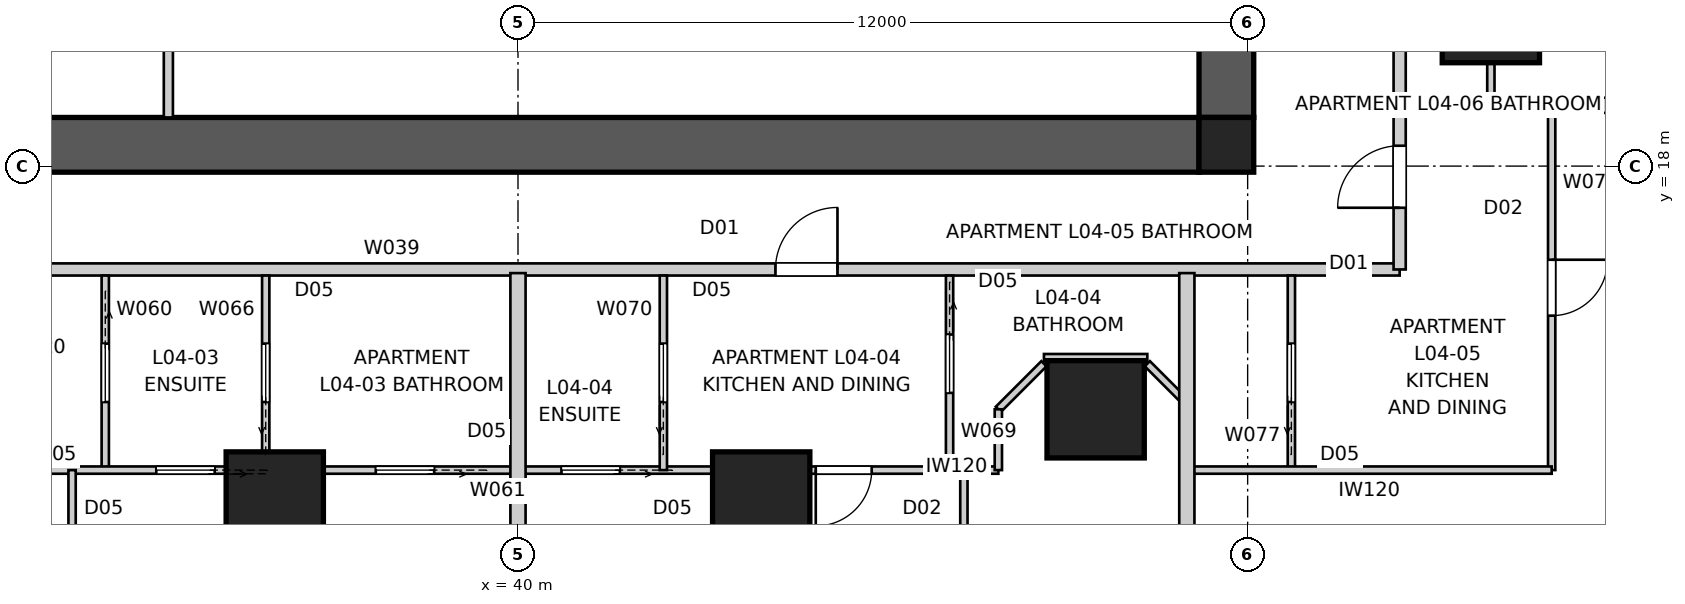
"""IFC4 building model, lengths in metres.
Left out: names, types, materials, properties, quantities, classifications, styles, units other than length and angle.
Written with IfcOpenShell. Run it as: python <this file> out.ifc"""

import sys

from ifc_helpers import new_model, si_unit, direction, frame, frame_2d, origin, origin_2d, place, context, subcontext, project, spatial, polyline, rectangle, outline, extrude, element, fill, save


model = new_model("IFC4")
c1 = context("Model", 3, precision=1e-05, world=origin(), true_north=direction((0.0, 1.0)))
c2 = subcontext(c1, "Body", "Model", "MODEL_VIEW")
j1 = project(units=[si_unit("LENGTHUNIT", "METRE"), si_unit("PLANEANGLEUNIT", "RADIAN")], contexts=[c1])
p1 = place(None, origin())
s1 = spatial("IfcSite", under=j1, at=p1, CompositionType="ELEMENT")
p2 = place(p1, origin())
s2 = spatial("IfcBuilding", under=s1, at=p2, CompositionType="ELEMENT")
p3 = place(p2, frame((0.0, 0.0, 18.4)))
s3 = spatial("IfcBuildingStorey", under=s2, at=p3, CompositionType="ELEMENT", Elevation=18.4)
p4 = place(p3, frame((51.2, 18.35, 0.0), z_axis=(0.0, 0.0, 1.0), x_axis=(-1.0, 0.0, 0.0)))
e1 = element("IfcWall", 1, at=p4, inside=s3, PredefinedType="SHEAR", context=c2, shape_type="SweptSolid", body=[
    extrude(outline(polyline([(0.0, -0.45), (22.4, -0.45), (22.4, -0.025), (22.85, -0.025), (22.85, 0.025), (22.4, 0.025), (22.4, 0.45), (0.0, 0.45), (0.0, 0.025), (-0.45, 0.025), (-0.45, -0.025), (0.0, -0.025), (0.0, -0.45)])), origin(), (0.0, 0.0, 1.0), 3.4),
])
p5 = place(p3, frame((51.65, 18.8, 0.0), z_axis=(0.0, 0.0, 1.0), x_axis=(0.0, 1.0, 0.0)))
e2 = element("IfcWall", 2, at=p5, inside=s3, PredefinedType="SHEAR", context=c2, shape_type="SweptSolid", body=[
    extrude(outline(polyline([(0.0, -0.45), (22.4, -0.45), (22.4, -0.025), (22.85, -0.025), (22.85, 0.025), (22.4, 0.025), (22.4, 0.45), (0.0, 0.45), (0.0, 0.025), (-0.45, 0.025), (-0.45, -0.025), (0.0, -0.025), (0.0, -0.45)])), origin(), (0.0, 0.0, 1.0), 3.4),
])
p6 = place(p5, frame((11.14, 0.0, 0.0)))
e3 = element("IfcOpeningElement", 3, at=p6, cuts=e2, PredefinedType="OPENING", context=c2, shape_type="SweptSolid", body=[
    extrude(rectangle(XDim=1.02, YDim=2.4, at=frame_2d((0.51, 1.2))), frame((0.0, 0.46, 0.0), z_axis=(0.0, -1.0, 0.0), x_axis=(1.0, 0.0, 0.0)), (0.0, 0.0, 1.0), 0.92),
])
p7 = place(p3, frame((51.65, 18.35, 0.0), z_axis=(0.0, 0.0, 1.0), x_axis=(1.0, 0.0, 0.0)))
e4 = element("IfcColumn", 4, at=p7, inside=s3, PredefinedType="COLUMN", context=c2, shape_type="SweptSolid", body=[
    extrude(rectangle(XDim=0.9, YDim=0.9, at=origin_2d()), origin(), (0.0, 0.0, 1.0), 3.4),
])
for number, where, z_axis, x_axis in (
    (5, (36.0, 12.5, 0.0), (0.0, 0.0, 1.0), (1.0, 0.0, 0.0)),
    (6, (44.0, 12.5, 0.0), (0.0, 0.0, 1.0), (1.0, 0.0, 0.0)),
    (7, (49.5, 14.0, 0.0), (0.0, 0.0, 1.0), (1.0, 0.0, 0.0)),
    (8, (56.0, 20.5, 0.0), (0.0, 0.0, 1.0), (1.0, 0.0, 0.0)),
):
    element("IfcColumn", number, at=place(p3, frame(where, z_axis=z_axis, x_axis=x_axis)), inside=s3, PredefinedType="COLUMN", context=c2, shape_type="SweptSolid", body=[
        extrude(rectangle(XDim=1.6, YDim=1.6, at=origin_2d()), origin(), (0.0, 0.0, 1.0), 3.4),
    ])
p8 = place(p3, frame((25.5, 16.3, 0.0), z_axis=(0.0, 0.0, 1.0), x_axis=(1.0, 0.0, 0.0)))
e9 = element("IfcWall", 9, at=p8, inside=s3, PredefinedType="PARTITIONING", context=c2, shape_type="SweptSolid", body=[
    extrude(rectangle(XDim=29.0, YDim=0.2, at=frame_2d((14.5, 0.0))), origin(), (0.0, 0.0, 1.0), 3.25),
])
p9 = place(p8, frame((18.734, 0.0, 0.0)))
e10 = element("IfcOpeningElement", 10, at=p9, cuts=e9, PredefinedType="OPENING", context=c2, shape_type="SweptSolid", body=[
    extrude(rectangle(XDim=1.02, YDim=2.34, at=frame_2d((0.51, 1.17))), frame((0.0, 0.11, 0.0), z_axis=(0.0, -1.0, 0.0), x_axis=(1.0, 0.0, 0.0)), (0.0, 0.0, 1.0), 0.22),
])
p10 = place(p8, frame((5.096, 0.0, 0.0)))
e11 = element("IfcOpeningElement", 11, at=p10, cuts=e9, PredefinedType="OPENING", context=c2, shape_type="SweptSolid", body=[
    extrude(rectangle(XDim=1.02, YDim=2.34, at=frame_2d((0.51, 1.17))), frame((0.0, 0.11, 0.0), z_axis=(0.0, -1.0, 0.0), x_axis=(1.0, 0.0, 0.0)), (0.0, 0.0, 1.0), 0.22),
])
p11 = place(p3, frame((54.5, 16.3, 0.0), z_axis=(0.0, 0.0, 1.0), x_axis=(0.0, 1.0, 0.0)))
e12 = element("IfcWall", 12, at=p11, inside=s3, PredefinedType="PARTITIONING", context=c2, shape_type="SweptSolid", body=[
    extrude(rectangle(XDim=27.4, YDim=0.2, at=frame_2d((13.7, 0.0))), origin(), (0.0, 0.0, 1.0), 3.25),
])
p12 = place(p11, frame((20.998, 0.0, 0.0)))
e13 = element("IfcOpeningElement", 13, at=p12, cuts=e12, PredefinedType="OPENING", context=c2, shape_type="SweptSolid", body=[
    extrude(rectangle(XDim=1.02, YDim=2.34, at=frame_2d((0.51, 1.17))), frame((0.0, 0.11, 0.0), z_axis=(0.0, -1.0, 0.0), x_axis=(1.0, 0.0, 0.0)), (0.0, 0.0, 1.0), 0.22),
])
p13 = place(p11, frame((11.119, 0.0, 0.0)))
e14 = element("IfcOpeningElement", 14, at=p13, cuts=e12, PredefinedType="OPENING", context=c2, shape_type="SweptSolid", body=[
    extrude(rectangle(XDim=1.02, YDim=2.34, at=frame_2d((0.51, 1.17))), frame((0.0, 0.11, 0.0), z_axis=(0.0, -1.0, 0.0), x_axis=(1.0, 0.0, 0.0)), (0.0, 0.0, 1.0), 0.22),
])
p14 = place(p11, frame((1.015, 0.0, 0.0)))
e15 = element("IfcOpeningElement", 15, at=p14, cuts=e12, PredefinedType="OPENING", context=c2, shape_type="SweptSolid", body=[
    extrude(rectangle(XDim=1.02, YDim=2.34, at=frame_2d((0.51, 1.17))), frame((0.0, 0.11, 0.0), z_axis=(0.0, -1.0, 0.0), x_axis=(1.0, 0.0, 0.0)), (0.0, 0.0, 1.0), 0.22),
])
p15 = place(p3, frame((40.0, 4.0, 0.0), z_axis=(0.0, 0.0, 1.0), x_axis=(0.0, 1.0, 0.0)))
e16 = element("IfcWall", 16, at=p15, inside=s3, PredefinedType="PARTITIONING", context=c2, shape_type="SweptSolid", body=[
    extrude(rectangle(XDim=8.5, YDim=0.25, at=frame_2d((4.25, 0.0))), origin(), (0.0, 0.0, 1.0), 3.25),
])
p16 = place(p3, frame((40.0, 12.5, 0.0), z_axis=(0.0, 0.0, 1.0), x_axis=(0.0, 1.0, 0.0)))
e17 = element("IfcWall", 17, at=p16, inside=s3, PredefinedType="PARTITIONING", context=c2, shape_type="SweptSolid", body=[
    extrude(rectangle(XDim=3.74, YDim=0.25, at=frame_2d((1.87, 0.0))), origin(), (0.0, 0.0, 1.0), 2.795),
])
p17 = place(p3, frame((51.0, 4.0, 0.0), z_axis=(0.0, 0.0, 1.0), x_axis=(0.0, 1.0, 0.0)))
e18 = element("IfcWall", 18, at=p17, inside=s3, PredefinedType="PARTITIONING", context=c2, shape_type="SweptSolid", body=[
    extrude(rectangle(XDim=12.24, YDim=0.25, at=frame_2d((6.12, 0.0))), origin(), (0.0, 0.0, 1.0), 3.25),
])
p18 = place(p3, frame((66.0, 19.0, 0.0), z_axis=(0.0, 0.0, 1.0), x_axis=(-1.0, 0.0, 0.0)))
e19 = element("IfcWall", 19, at=p18, inside=s3, PredefinedType="PARTITIONING", context=c2, shape_type="SweptSolid", body=[
    extrude(rectangle(XDim=11.44, YDim=0.25, at=frame_2d((5.72, 0.0))), origin(), (0.0, 0.0, 1.0), 3.25),
])
p19 = place(p3, frame((34.25, 18.8, 0.0), z_axis=(0.0, 0.0, 1.0), x_axis=(0.0, 1.0, 0.0)))
e20 = element("IfcWall", 20, at=p19, inside=s3, PredefinedType="SOLIDWALL", context=c2, shape_type="SweptSolid", body=[
    extrude(rectangle(XDim=5.9, YDim=0.15, at=frame_2d((2.95, 0.0))), origin(), (0.0, 0.0, 1.0), 3.25),
])
p20 = place(p3, frame((33.212, 16.2, 0.0), z_axis=(0.0, 0.0, 1.0), x_axis=(0.0, -1.0, 0.0)))
e21 = element("IfcWall", 21, at=p20, inside=s3, PredefinedType="PARTITIONING", context=c2, shape_type="SweptSolid", body=[
    extrude(rectangle(XDim=3.2, YDim=0.12, at=frame_2d((1.6, 0.0))), origin(), (0.0, 0.0, 1.0), 3.25),
])
p21 = place(p20, frame((1.12, 0.0, 0.0)))
e22 = element("IfcOpeningElement", 22, at=p21, cuts=e21, PredefinedType="OPENING", context=c2, shape_type="SweptSolid", body=[
    extrude(rectangle(XDim=0.96, YDim=2.1, at=frame_2d((0.48, 1.05))), frame((0.0, 0.07, 0.0), z_axis=(0.0, -1.0, 0.0), x_axis=(1.0, 0.0, 0.0)), (0.0, 0.0, 1.0), 0.14),
])
p22 = place(p3, frame((47.9, 13.0, 0.0), z_axis=(0.0, 0.0, 1.0), x_axis=(-1.0, 0.0, 0.0)))
e23 = element("IfcWall", 23, at=p22, inside=s3, PredefinedType="PARTITIONING", context=c2, shape_type="SweptSolid", body=[
    extrude(rectangle(XDim=15.8, YDim=0.12, at=frame_2d((7.9, 0.0))), origin(), (0.0, 0.0, 1.0), 2.55),
])
p23 = place(p22, frame((2.083, 0.0, 0.0)))
e24 = element("IfcOpeningElement", 24, at=p23, cuts=e23, PredefinedType="OPENING", context=c2, shape_type="SweptSolid", body=[
    extrude(rectangle(XDim=0.92, YDim=2.34, at=frame_2d((0.46, 1.17))), frame((0.0, 0.07, 0.0), z_axis=(0.0, -1.0, 0.0), x_axis=(1.0, 0.0, 0.0)), (0.0, 0.0, 1.0), 0.14),
])
p24 = place(p22, frame((6.225, 0.0, 0.0)))
e25 = element("IfcOpeningElement", 25, at=p24, cuts=e23, PredefinedType="OPENING", context=c2, shape_type="SweptSolid", body=[
    extrude(rectangle(XDim=0.96, YDim=2.1, at=frame_2d((0.48, 1.05))), frame((0.0, 0.07, 0.0), z_axis=(0.0, -1.0, 0.0), x_axis=(1.0, 0.0, 0.0)), (0.0, 0.0, 1.0), 0.14),
])
p25 = place(p22, frame((12.888, 0.0, 0.0)))
e26 = element("IfcOpeningElement", 26, at=p25, cuts=e23, PredefinedType="OPENING", context=c2, shape_type="SweptSolid", body=[
    extrude(rectangle(XDim=0.96, YDim=2.1, at=frame_2d((0.48, 1.05))), frame((0.0, 0.07, 0.0), z_axis=(0.0, -1.0, 0.0), x_axis=(1.0, 0.0, 0.0)), (0.0, 0.0, 1.0), 0.14),
])
p26 = place(p22, frame((9.278, 0.0, 0.0)))
e27 = element("IfcOpeningElement", 27, at=p26, cuts=e23, PredefinedType="OPENING", context=c2, shape_type="SweptSolid", body=[
    extrude(rectangle(XDim=0.96, YDim=2.1, at=frame_2d((0.48, 1.05))), frame((0.0, 0.07, 0.0), z_axis=(0.0, -1.0, 0.0), x_axis=(1.0, 0.0, 0.0)), (0.0, 0.0, 1.0), 0.14),
])
p27 = place(p3, frame((35.851, 13.0, 0.0), z_axis=(0.0, 0.0, 1.0), x_axis=(0.0, 1.0, 0.0)))
e28 = element("IfcWall", 28, at=p27, inside=s3, PredefinedType="PARTITIONING", context=c2, shape_type="SweptSolid", body=[
    extrude(rectangle(XDim=3.2, YDim=0.12, at=frame_2d((1.6, 0.0))), origin(), (0.0, 0.0, 1.0), 3.25),
])
p28 = place(p27, frame((1.12, 0.0, 0.0)))
e29 = element("IfcOpeningElement", 29, at=p28, cuts=e28, PredefinedType="OPENING", context=c2, shape_type="SweptSolid", body=[
    extrude(rectangle(XDim=0.96, YDim=2.1, at=frame_2d((0.48, 1.05))), frame((0.0, 0.07, 0.0), z_axis=(0.0, -1.0, 0.0), x_axis=(1.0, 0.0, 0.0)), (0.0, 0.0, 1.0), 0.14),
])
p29 = place(p3, frame((32.667, 13.0, 0.0), z_axis=(0.0, 0.0, 1.0), x_axis=(0.0, -1.0, 0.0)))
e30 = element("IfcWall", 30, at=p29, inside=s3, PredefinedType="PARTITIONING", context=c2, shape_type="SweptSolid", body=[
    extrude(rectangle(XDim=8.96, YDim=0.12, at=frame_2d((4.48, 0.0))), origin(), (0.0, 0.0, 1.0), 3.25),
])
p30 = place(p29, frame((4.04, 0.0, 0.0)))
e31 = element("IfcOpeningElement", 31, at=p30, cuts=e30, PredefinedType="OPENING", context=c2, shape_type="SweptSolid", body=[
    extrude(rectangle(XDim=0.92, YDim=2.34, at=frame_2d((0.46, 1.17))), frame((0.0, 0.07, 0.0), z_axis=(0.0, -1.0, 0.0), x_axis=(1.0, 0.0, 0.0)), (0.0, 0.0, 1.0), 0.14),
])
p31 = place(p3, frame((36.333, 4.04, 0.0), z_axis=(0.0, 0.0, 1.0), x_axis=(0.0, 1.0, 0.0)))
e32 = element("IfcWall", 32, at=p31, inside=s3, PredefinedType="PARTITIONING", context=c2, shape_type="SweptSolid", body=[
    extrude(rectangle(XDim=8.96, YDim=0.12, at=frame_2d((4.48, 0.0))), origin(), (0.0, 0.0, 1.0), 3.25),
])
p32 = place(p3, frame((47.098, 16.2, 0.0), z_axis=(0.0, 0.0, 1.0), x_axis=(0.0, -1.0, 0.0)))
e33 = element("IfcWall", 33, at=p32, inside=s3, PredefinedType="PARTITIONING", context=c2, shape_type="SweptSolid", body=[
    extrude(rectangle(XDim=3.2, YDim=0.12, at=frame_2d((1.6, 0.0))), origin(), (0.0, 0.0, 1.0), 3.25),
])
p33 = place(p32, frame((0.97, 0.0, 0.0)))
e34 = element("IfcOpeningElement", 34, at=p33, cuts=e33, PredefinedType="OPENING", context=c2, shape_type="SweptSolid", body=[
    extrude(rectangle(XDim=0.96, YDim=2.1, at=frame_2d((0.48, 1.05))), frame((0.0, 0.07, 0.0), z_axis=(0.0, -1.0, 0.0), x_axis=(1.0, 0.0, 0.0)), (0.0, 0.0, 1.0), 0.14),
])
p34 = place(p3, frame((42.391, 13.0, 0.0), z_axis=(0.0, 0.0, 1.0), x_axis=(0.0, 1.0, 0.0)))
e35 = element("IfcWall", 35, at=p34, inside=s3, PredefinedType="PARTITIONING", context=c2, shape_type="SweptSolid", body=[
    extrude(rectangle(XDim=3.2, YDim=0.12, at=frame_2d((1.6, 0.0))), origin(), (0.0, 0.0, 1.0), 3.25),
])
p35 = place(p34, frame((1.12, 0.0, 0.0)))
e36 = element("IfcOpeningElement", 36, at=p35, cuts=e35, PredefinedType="OPENING", context=c2, shape_type="SweptSolid", body=[
    extrude(rectangle(XDim=0.96, YDim=2.1, at=frame_2d((0.48, 1.05))), frame((0.0, 0.07, 0.0), z_axis=(0.0, -1.0, 0.0), x_axis=(1.0, 0.0, 0.0)), (0.0, 0.0, 1.0), 0.14),
])
p36 = place(p3, frame((51.0, 14.1, 0.0), z_axis=(0.0, 0.0, 1.0), x_axis=(-0.707106781187, 0.707106781187, 0.0)))
e37 = element("IfcWall", 37, at=p36, inside=s3, PredefinedType="PARTITIONING", context=c2, shape_type="SweptSolid", body=[
    extrude(rectangle(XDim=0.919, YDim=0.12, at=frame_2d((0.459, 0.0))), origin(), (0.0, 0.0, 1.0), 3.25),
])
p37 = place(p3, frame((50.35, 14.85, 0.0), z_axis=(0.0, 0.0, 1.0), x_axis=(-1.0, 0.0, 0.0)))
e38 = element("IfcWall", 38, at=p37, inside=s3, PredefinedType="PARTITIONING", context=c2, shape_type="SweptSolid", body=[
    extrude(rectangle(XDim=1.7, YDim=0.12, at=frame_2d((0.85, 0.0))), origin(), (0.0, 0.0, 1.0), 3.25),
])
p38 = place(p3, frame((48.65, 14.75, 0.0), z_axis=(0.0, 0.0, 1.0), x_axis=(-0.707106781187, -0.707106781187, 0.0)))
e39 = element("IfcWall", 39, at=p38, inside=s3, PredefinedType="PARTITIONING", context=c2, shape_type="SweptSolid", body=[
    extrude(rectangle(XDim=1.061, YDim=0.12, at=frame_2d((0.53, 0.0))), origin(), (0.0, 0.0, 1.0), 3.25),
])
p39 = place(p3, frame((47.9, 14.0, 0.0), z_axis=(0.0, 0.0, 1.0), x_axis=(0.0, -1.0, 0.0)))
e40 = element("IfcWall", 40, at=p39, inside=s3, PredefinedType="PARTITIONING", context=c2, shape_type="SweptSolid", body=[
    extrude(rectangle(XDim=1.0, YDim=0.12, at=frame_2d((0.5, 0.0))), origin(), (0.0, 0.0, 1.0), 3.25),
])
p40 = place(p3, frame((43.667, 13.0, 0.0), z_axis=(0.0, 0.0, 1.0), x_axis=(0.0, -1.0, 0.0)))
e41 = element("IfcWall", 41, at=p40, inside=s3, PredefinedType="PARTITIONING", context=c2, shape_type="SweptSolid", body=[
    extrude(rectangle(XDim=8.96, YDim=0.12, at=frame_2d((4.48, 0.0))), origin(), (0.0, 0.0, 1.0), 3.25),
])
p41 = place(p3, frame((47.333, 4.04, 0.0), z_axis=(0.0, 0.0, 1.0), x_axis=(0.0, 1.0, 0.0)))
e42 = element("IfcWall", 42, at=p41, inside=s3, PredefinedType="PARTITIONING", context=c2, shape_type="SweptSolid", body=[
    extrude(rectangle(XDim=8.96, YDim=0.12, at=frame_2d((4.48, 0.0))), origin(), (0.0, 0.0, 1.0), 3.25),
])
p42 = place(p41, frame((4.0, 0.0, 0.0)))
e43 = element("IfcOpeningElement", 43, at=p42, cuts=e42, PredefinedType="OPENING", context=c2, shape_type="SweptSolid", body=[
    extrude(rectangle(XDim=0.92, YDim=2.34, at=frame_2d((0.46, 1.17))), frame((0.0, 0.07, 0.0), z_axis=(0.0, -1.0, 0.0), x_axis=(1.0, 0.0, 0.0)), (0.0, 0.0, 1.0), 0.14),
])
p43 = place(p3, frame((52.719, 13.0, 0.0), z_axis=(0.0, 0.0, 1.0), x_axis=(0.0, 1.0, 0.0)))
e44 = element("IfcWall", 44, at=p43, inside=s3, PredefinedType="PARTITIONING", context=c2, shape_type="SweptSolid", body=[
    extrude(rectangle(XDim=3.2, YDim=0.12, at=frame_2d((1.6, 0.0))), origin(), (0.0, 0.0, 1.0), 3.25),
])
p44 = place(p43, frame((1.12, 0.0, 0.0)))
e45 = element("IfcOpeningElement", 45, at=p44, cuts=e44, PredefinedType="OPENING", context=c2, shape_type="SweptSolid", body=[
    extrude(rectangle(XDim=0.96, YDim=2.1, at=frame_2d((0.48, 1.05))), frame((0.0, 0.07, 0.0), z_axis=(0.0, -1.0, 0.0), x_axis=(1.0, 0.0, 0.0)), (0.0, 0.0, 1.0), 0.14),
])
p45 = place(p3, frame((57.0, 19.0, 0.0), z_axis=(0.0, 0.0, 1.0), x_axis=(0.0, -1.0, 0.0)))
e46 = element("IfcWall", 46, at=p45, inside=s3, PredefinedType="PARTITIONING", context=c2, shape_type="SweptSolid", body=[
    extrude(rectangle(XDim=6.0, YDim=0.12, at=frame_2d((3.0, 0.0))), origin(), (0.0, 0.0, 1.0), 3.25),
])
p46 = place(p45, frame((2.54, 0.0, 0.0)))
e47 = element("IfcOpeningElement", 47, at=p46, cuts=e46, PredefinedType="OPENING", context=c2, shape_type="SweptSolid", body=[
    extrude(rectangle(XDim=0.92, YDim=2.34, at=frame_2d((0.46, 1.17))), frame((0.0, 0.07, 0.0), z_axis=(0.0, -1.0, 0.0), x_axis=(1.0, 0.0, 0.0)), (0.0, 0.0, 1.0), 0.14),
])
p47 = place(p3, frame((57.0, 13.0, 0.0), z_axis=(0.0, 0.0, 1.0), x_axis=(-1.0, 0.0, 0.0)))
e48 = element("IfcWall", 48, at=p47, inside=s3, PredefinedType="PARTITIONING", context=c2, shape_type="SweptSolid", body=[
    extrude(rectangle(XDim=6.0, YDim=0.12, at=frame_2d((3.0, 0.0))), origin(), (0.0, 0.0, 1.0), 3.25),
])
p48 = place(p3, frame((56.0, 22.649, 0.0), z_axis=(0.0, 0.0, 1.0), x_axis=(0.0, -1.0, 0.0)))
e49 = element("IfcWall", 49, at=p48, inside=s3, PredefinedType="PARTITIONING", context=c2, shape_type="SweptSolid", body=[
    extrude(rectangle(XDim=3.649, YDim=0.12, at=frame_2d((1.824, 0.0))), origin(), (0.0, 0.0, 1.0), 2.55),
])
p49 = place(p9, origin())
e50 = element("IfcDoor", 50, at=p49, inside=s3, OperationType="SINGLE_SWING_RIGHT", PredefinedType="DOOR", context=c2, shape_type="SweptSolid", body=[
    extrude(rectangle(XDim=1.02, YDim=2.34, at=frame_2d((0.51, 1.17))), frame((0.0, 0.025, 0.0), z_axis=(0.0, -1.0, 0.0), x_axis=(1.0, 0.0, 0.0)), (0.0, 0.0, 1.0), 0.05),
])
fill(e10, e50)
p50 = place(p14, origin())
e51 = element("IfcDoor", 51, at=p50, inside=s3, OperationType="SINGLE_SWING_LEFT", PredefinedType="DOOR", context=c2, shape_type="SweptSolid", body=[
    extrude(rectangle(XDim=1.02, YDim=2.34, at=frame_2d((0.51, 1.17))), frame((0.0, 0.025, 0.0), z_axis=(0.0, -1.0, 0.0), x_axis=(1.0, 0.0, 0.0)), (0.0, 0.0, 1.0), 0.05),
])
fill(e15, e51)
p51 = place(p23, origin())
e52 = element("IfcDoor", 52, at=p51, inside=s3, OperationType="SINGLE_SWING_RIGHT", PredefinedType="DOOR", context=c2, shape_type="SweptSolid", body=[
    extrude(rectangle(XDim=0.92, YDim=2.34, at=frame_2d((0.46, 1.17))), frame((0.0, 0.025, 0.0), z_axis=(0.0, -1.0, 0.0), x_axis=(1.0, 0.0, 0.0)), (0.0, 0.0, 1.0), 0.05),
])
fill(e24, e52)
p52 = place(p33, origin())
e53 = element("IfcDoor", 53, at=p52, inside=s3, OperationType="SLIDING_TO_LEFT", PredefinedType="DOOR", context=c2, shape_type="SweptSolid", body=[
    extrude(rectangle(XDim=0.96, YDim=2.1, at=frame_2d((0.48, 1.05))), frame((0.0, 0.025, 0.0), z_axis=(0.0, -1.0, 0.0), x_axis=(1.0, 0.0, 0.0)), (0.0, 0.0, 1.0), 0.05),
])
fill(e34, e53)
p53 = place(p35, origin())
e54 = element("IfcDoor", 54, at=p53, inside=s3, OperationType="SLIDING_TO_LEFT", PredefinedType="DOOR", context=c2, shape_type="SweptSolid", body=[
    extrude(rectangle(XDim=0.96, YDim=2.1, at=frame_2d((0.48, 1.05))), frame((0.0, 0.025, 0.0), z_axis=(0.0, -1.0, 0.0), x_axis=(1.0, 0.0, 0.0)), (0.0, 0.0, 1.0), 0.05),
])
fill(e36, e54)
p54 = place(p21, origin())
e55 = element("IfcDoor", 55, at=p54, inside=s3, OperationType="SLIDING_TO_LEFT", PredefinedType="DOOR", context=c2, shape_type="SweptSolid", body=[
    extrude(rectangle(XDim=0.96, YDim=2.1, at=frame_2d((0.48, 1.05))), frame((0.0, 0.025, 0.0), z_axis=(0.0, -1.0, 0.0), x_axis=(1.0, 0.0, 0.0)), (0.0, 0.0, 1.0), 0.05),
])
fill(e22, e55)
p55 = place(p46, origin())
e56 = element("IfcDoor", 56, at=p55, inside=s3, OperationType="SINGLE_SWING_LEFT", PredefinedType="DOOR", context=c2, shape_type="SweptSolid", body=[
    extrude(rectangle(XDim=0.92, YDim=2.34, at=frame_2d((0.46, 1.17))), frame((0.0, 0.025, 0.0), z_axis=(0.0, -1.0, 0.0), x_axis=(1.0, 0.0, 0.0)), (0.0, 0.0, 1.0), 0.05),
])
fill(e47, e56)
p56 = place(p44, origin())
e57 = element("IfcDoor", 57, at=p56, inside=s3, OperationType="SLIDING_TO_LEFT", PredefinedType="DOOR", context=c2, shape_type="SweptSolid", body=[
    extrude(rectangle(XDim=0.96, YDim=2.1, at=frame_2d((0.48, 1.05))), frame((0.0, 0.025, 0.0), z_axis=(0.0, -1.0, 0.0), x_axis=(1.0, 0.0, 0.0)), (0.0, 0.0, 1.0), 0.05),
])
fill(e45, e57)
p57 = place(p24, origin())
e58 = element("IfcDoor", 58, at=p57, inside=s3, OperationType="SLIDING_TO_LEFT", PredefinedType="DOOR", context=c2, shape_type="SweptSolid", body=[
    extrude(rectangle(XDim=0.96, YDim=2.1, at=frame_2d((0.48, 1.05))), frame((0.0, 0.025, 0.0), z_axis=(0.0, -1.0, 0.0), x_axis=(1.0, 0.0, 0.0)), (0.0, 0.0, 1.0), 0.05),
])
fill(e25, e58)
p58 = place(p28, origin())
e59 = element("IfcDoor", 59, at=p58, inside=s3, OperationType="SLIDING_TO_LEFT", PredefinedType="DOOR", context=c2, shape_type="SweptSolid", body=[
    extrude(rectangle(XDim=0.96, YDim=2.1, at=frame_2d((0.48, 1.05))), frame((0.0, 0.025, 0.0), z_axis=(0.0, -1.0, 0.0), x_axis=(1.0, 0.0, 0.0)), (0.0, 0.0, 1.0), 0.05),
])
fill(e29, e59)
p59 = place(p25, origin())
e60 = element("IfcDoor", 60, at=p59, inside=s3, OperationType="SLIDING_TO_LEFT", PredefinedType="DOOR", context=c2, shape_type="SweptSolid", body=[
    extrude(rectangle(XDim=0.96, YDim=2.1, at=frame_2d((0.48, 1.05))), frame((0.0, 0.025, 0.0), z_axis=(0.0, -1.0, 0.0), x_axis=(1.0, 0.0, 0.0)), (0.0, 0.0, 1.0), 0.05),
])
fill(e26, e60)
p60 = place(p26, origin())
e61 = element("IfcDoor", 61, at=p60, inside=s3, OperationType="SLIDING_TO_LEFT", PredefinedType="DOOR", context=c2, shape_type="SweptSolid", body=[
    extrude(rectangle(XDim=0.96, YDim=2.1, at=frame_2d((0.48, 1.05))), frame((0.0, 0.025, 0.0), z_axis=(0.0, -1.0, 0.0), x_axis=(1.0, 0.0, 0.0)), (0.0, 0.0, 1.0), 0.05),
])
fill(e27, e61)
save(model, sys.argv[1])
